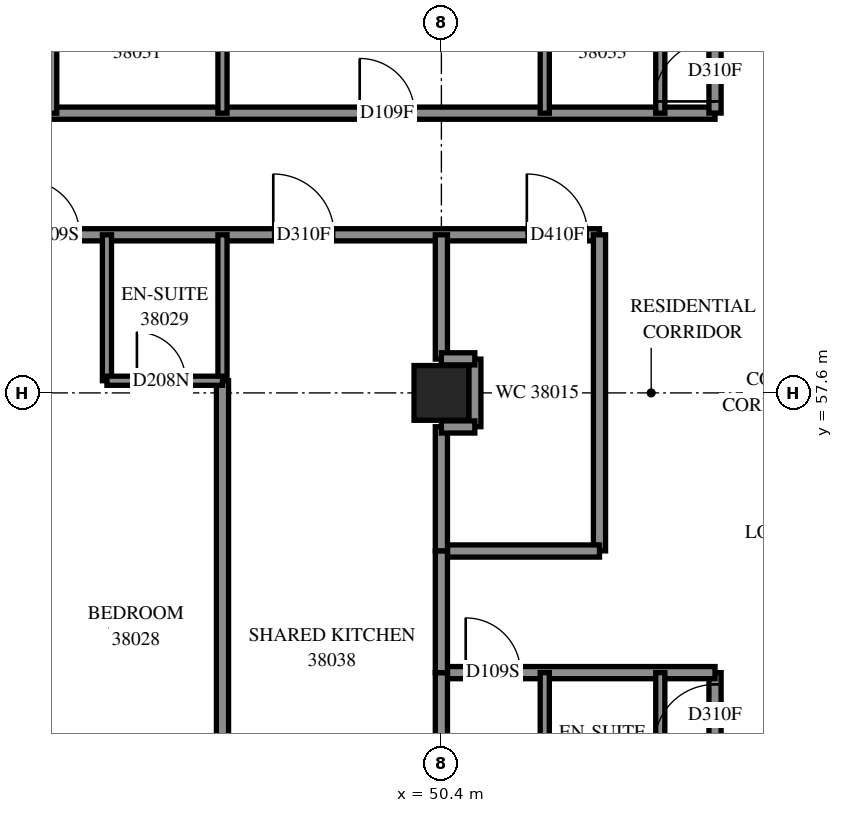
"""IFC4 building model, lengths in metres.
Left out: names, types, materials, properties, quantities, classifications, styles, units other than length and angle.
Written with IfcOpenShell. Run it as: python <this file> out.ifc"""

import sys

from ifc_helpers import new_model, si_unit, direction, frame, frame_2d, origin, origin_2d, place, context, subcontext, project, spatial, rectangle, extrude, element, fill, save


model = new_model("IFC4")
c1 = context("Model", 3, precision=1e-05, world=origin(), true_north=direction((0.0, 1.0)))
c2 = subcontext(c1, "Body", "Model", "MODEL_VIEW")
j1 = project(units=[si_unit("LENGTHUNIT", "METRE"), si_unit("PLANEANGLEUNIT", "RADIAN")], contexts=[c1])
p1 = place(None, origin())
s1 = spatial("IfcSite", under=j1, at=p1, CompositionType="ELEMENT")
p2 = place(p1, origin())
s2 = spatial("IfcBuilding", under=s1, at=p2, CompositionType="ELEMENT")
p3 = place(p2, frame((0.0, 0.0, 142.2)))
s3 = spatial("IfcBuildingStorey", under=s2, at=p3, CompositionType="ELEMENT", Elevation=142.2)
p4 = place(p3, frame((50.4, 57.6, 0.0), z_axis=(0.0, 0.0, 1.0), x_axis=(1.0, 0.0, 0.0)))
e1 = element("IfcColumn", 1, at=p4, inside=s3, PredefinedType="COLUMN", context=c2, shape_type="SweptSolid", body=[
    extrude(rectangle(XDim=0.9, YDim=0.9, at=origin_2d()), origin(), (0.0, 0.0, 1.0), 3.1),
])
p5 = place(p3, frame((36.0, 60.2, 0.0), z_axis=(0.0, 0.0, 1.0), x_axis=(1.0, 0.0, 0.0)))
e2 = element("IfcWall", 2, at=p5, inside=s3, PredefinedType="PARTITIONING", context=c2, shape_type="SweptSolid", body=[
    extrude(rectangle(XDim=17.0, YDim=0.2, at=frame_2d((8.5, 0.0))), origin(), (0.0, 0.0, 1.0), 3.1),
])
p6 = place(p5, frame((15.805, 0.0, 0.0)))
e3 = element("IfcOpeningElement", 3, at=p6, cuts=e2, PredefinedType="OPENING", context=c2, shape_type="SweptSolid", body=[
    extrude(rectangle(XDim=1.0, YDim=2.1, at=frame_2d((0.5, 1.05))), frame((0.0, 0.11, 0.0), z_axis=(0.0, -1.0, 0.0), x_axis=(1.0, 0.0, 0.0)), (0.0, 0.0, 1.0), 0.22),
])
p7 = place(p5, frame((4.125, 0.0, 0.0)))
e4 = element("IfcOpeningElement", 4, at=p7, cuts=e2, PredefinedType="OPENING", context=c2, shape_type="SweptSolid", body=[
    extrude(rectangle(XDim=1.0, YDim=2.1, at=frame_2d((0.5, 1.05))), frame((0.0, 0.11, 0.0), z_axis=(0.0, -1.0, 0.0), x_axis=(1.0, 0.0, 0.0)), (0.0, 0.0, 1.0), 0.22),
])
p8 = place(p5, frame((7.55, 0.0, 0.0)))
e5 = element("IfcOpeningElement", 5, at=p8, cuts=e2, PredefinedType="OPENING", context=c2, shape_type="SweptSolid", body=[
    extrude(rectangle(XDim=0.9, YDim=2.1, at=frame_2d((0.45, 1.05))), frame((0.0, 0.11, 0.0), z_axis=(0.0, -1.0, 0.0), x_axis=(1.0, 0.0, 0.0)), (0.0, 0.0, 1.0), 0.22),
])
p9 = place(p5, frame((11.635, 0.0, 0.0)))
e6 = element("IfcOpeningElement", 6, at=p9, cuts=e2, PredefinedType="OPENING", context=c2, shape_type="SweptSolid", body=[
    extrude(rectangle(XDim=1.0, YDim=2.1, at=frame_2d((0.5, 1.05))), frame((0.0, 0.11, 0.0), z_axis=(0.0, -1.0, 0.0), x_axis=(1.0, 0.0, 0.0)), (0.0, 0.0, 1.0), 0.22),
])
p10 = place(p3, frame((40.602, 62.2, 0.0), z_axis=(0.0, 0.0, 1.0), x_axis=(1.0, 0.0, 0.0)))
e7 = element("IfcWall", 7, at=p10, inside=s3, PredefinedType="PARTITIONING", context=c2, shape_type="SweptSolid", body=[
    extrude(rectangle(XDim=14.298, YDim=0.2, at=frame_2d((7.149, 0.0))), origin(), (0.0, 0.0, 1.0), 3.1),
])
p11 = place(p10, frame((1.306, 0.0, 0.0)))
e8 = element("IfcOpeningElement", 8, at=p11, cuts=e7, PredefinedType="OPENING", context=c2, shape_type="SweptSolid", body=[
    extrude(rectangle(XDim=0.9, YDim=2.1, at=frame_2d((0.45, 1.05))), frame((0.0, 0.11, 0.0), z_axis=(0.0, -1.0, 0.0), x_axis=(1.0, 0.0, 0.0)), (0.0, 0.0, 1.0), 0.22),
])
p12 = place(p10, frame((8.455, 0.0, 0.0)))
e9 = element("IfcOpeningElement", 9, at=p12, cuts=e7, PredefinedType="OPENING", context=c2, shape_type="SweptSolid", body=[
    extrude(rectangle(XDim=0.9, YDim=2.1, at=frame_2d((0.45, 1.05))), frame((0.0, 0.11, 0.0), z_axis=(0.0, -1.0, 0.0), x_axis=(1.0, 0.0, 0.0)), (0.0, 0.0, 1.0), 0.22),
])
p13 = place(p3, frame((46.8, 49.7, 0.0), z_axis=(0.0, 0.0, 1.0), x_axis=(0.0, 1.0, 0.0)))
e10 = element("IfcWall", 10, at=p13, inside=s3, PredefinedType="PARTITIONING", context=c2, shape_type="SweptSolid", body=[
    extrude(rectangle(XDim=8.1, YDim=0.2, at=frame_2d((4.05, 0.0))), origin(), (0.0, 0.0, 1.0), 3.1),
])
p14 = place(p3, frame((54.9, 47.7, 0.0), z_axis=(0.0, 0.0, 1.0), x_axis=(0.0, 1.0, 0.0)))
e11 = element("IfcWall", 11, at=p14, inside=s3, PredefinedType="PARTITIONING", context=c2, shape_type="SweptSolid", body=[
    extrude(rectangle(XDim=5.3, YDim=0.2, at=frame_2d((2.65, 0.0))), origin(), (0.0, 0.0, 1.0), 3.1),
])
p15 = place(p14, frame((4.106, 0.0, 0.0)))
e12 = element("IfcOpeningElement", 12, at=p15, cuts=e11, PredefinedType="OPENING", context=c2, shape_type="SweptSolid", body=[
    extrude(rectangle(XDim=1.0, YDim=2.1, at=frame_2d((0.5, 1.05))), frame((0.0, 0.11, 0.0), z_axis=(0.0, -1.0, 0.0), x_axis=(1.0, 0.0, 0.0)), (0.0, 0.0, 1.0), 0.22),
])
p16 = place(p3, frame((54.9, 62.202, 0.0), z_axis=(0.0, 0.0, 1.0), x_axis=(0.0, 1.0, 0.0)))
e13 = element("IfcWall", 13, at=p16, inside=s3, PredefinedType="PARTITIONING", context=c2, shape_type="SweptSolid", body=[
    extrude(rectangle(XDim=5.298, YDim=0.2, at=frame_2d((2.649, 0.0))), origin(), (0.0, 0.0, 1.0), 3.1),
])
p17 = place(p16, frame((0.192, 0.0, 0.0)))
e14 = element("IfcOpeningElement", 14, at=p17, cuts=e13, PredefinedType="OPENING", context=c2, shape_type="SweptSolid", body=[
    extrude(rectangle(XDim=1.0, YDim=2.1, at=frame_2d((0.5, 1.05))), frame((0.0, 0.11, 0.0), z_axis=(0.0, -1.0, 0.0), x_axis=(1.0, 0.0, 0.0)), (0.0, 0.0, 1.0), 0.22),
])
p18 = place(p3, frame((53.0, 55.002, 0.0), z_axis=(0.0, 0.0, 1.0), x_axis=(0.0, 1.0, 0.0)))
e15 = element("IfcWall", 15, at=p18, inside=s3, PredefinedType="PARTITIONING", context=c2, shape_type="SweptSolid", body=[
    extrude(rectangle(XDim=5.198, YDim=0.2, at=frame_2d((2.599, 0.0))), origin(), (0.0, 0.0, 1.0), 3.1),
])
p19 = place(p3, frame((50.4, 53.0, 0.0), z_axis=(0.0, 0.0, 1.0), x_axis=(1.0, 0.0, 0.0)))
e16 = element("IfcWall", 16, at=p19, inside=s3, PredefinedType="PARTITIONING", context=c2, shape_type="SweptSolid", body=[
    extrude(rectangle(XDim=4.5, YDim=0.2, at=frame_2d((2.25, 0.0))), origin(), (0.0, 0.0, 1.0), 3.1),
])
p20 = place(p19, frame((0.4, 0.0, 0.0)))
e17 = element("IfcOpeningElement", 17, at=p20, cuts=e16, PredefinedType="OPENING", context=c2, shape_type="SweptSolid", body=[
    extrude(rectangle(XDim=0.9, YDim=2.1, at=frame_2d((0.45, 1.05))), frame((0.0, 0.11, 0.0), z_axis=(0.0, -1.0, 0.0), x_axis=(1.0, 0.0, 0.0)), (0.0, 0.0, 1.0), 0.22),
])
p21 = place(p3, frame((50.4, 55.0, 0.0), z_axis=(0.0, 0.0, 1.0), x_axis=(1.0, 0.0, 0.0)))
e18 = element("IfcWall", 18, at=p21, inside=s3, PredefinedType="PARTITIONING", context=c2, shape_type="SweptSolid", body=[
    extrude(rectangle(XDim=2.6, YDim=0.2, at=frame_2d((1.3, 0.0))), origin(), (0.0, 0.0, 1.0), 3.1),
])
for number, where, z_axis, x_axis in (
    (19, (44.9, 57.8, 0.0), (0.0, 0.0, 1.0), (0.0, 1.0, 0.0)),
    (20, (46.8, 57.8, 0.0), (0.0, 0.0, 1.0), (0.0, 1.0, 0.0)),
    (21, (52.1, 50.6, 0.0), (0.0, 0.0, 1.0), (0.0, 1.0, 0.0)),
    (22, (54.0, 50.6, 0.0), (0.0, 0.0, 1.0), (0.0, 1.0, 0.0)),
    (23, (44.0, 62.2, 0.0), (0.0, 0.0, 1.0), (0.0, 1.0, 0.0)),
    (24, (46.8, 62.2, 0.0), (0.0, 0.0, 1.0), (0.0, 1.0, 0.0)),
    (25, (52.1, 62.2, 0.0), (0.0, 0.0, 1.0), (0.0, 1.0, 0.0)),
    (26, (54.0, 62.2, 0.0), (0.0, 0.0, 1.0), (0.0, 1.0, 0.0)),
):
    element("IfcWall", number, at=place(p3, frame(where, z_axis=z_axis, x_axis=x_axis)), inside=s3, PredefinedType="PARTITIONING", context=c2, shape_type="SweptSolid", body=[
        extrude(rectangle(XDim=2.4, YDim=0.15, at=frame_2d((1.2, 0.0))), origin(), (0.0, 0.0, 1.0), 3.1),
    ])
p22 = place(p3, frame((50.4, 50.85, 0.0), z_axis=(0.0, 0.0, 1.0), x_axis=(0.0, 1.0, 0.0)))
e27 = element("IfcWall", 27, at=p22, inside=s3, PredefinedType="PARTITIONING", context=c2, shape_type="SweptSolid", body=[
    extrude(rectangle(XDim=2.15, YDim=0.2, at=frame_2d((1.075, 0.0))), origin(), (0.0, 0.0, 1.0), 3.1),
])
for number, where, z_axis, x_axis in (
    (28, (50.4, 58.156, 0.0), (0.0, 0.0, 1.0), (0.0, 1.0, 0.0)),
    (29, (50.4, 55.0, 0.0), (0.0, 0.0, 1.0), (0.0, 1.0, 0.0)),
):
    element("IfcWall", number, at=place(p3, frame(where, z_axis=z_axis, x_axis=x_axis)), inside=s3, PredefinedType="PARTITIONING", context=c2, shape_type="SweptSolid", body=[
        extrude(rectangle(XDim=2.044, YDim=0.2, at=frame_2d((1.022, 0.0))), origin(), (0.0, 0.0, 1.0), 3.1),
    ])
p23 = place(p3, frame((50.4, 53.0, 0.0), z_axis=(0.0, 0.0, 1.0), x_axis=(0.0, 1.0, 0.0)))
e30 = element("IfcWall", 30, at=p23, inside=s3, PredefinedType="PARTITIONING", context=c2, shape_type="SweptSolid", body=[
    extrude(rectangle(XDim=2.0, YDim=0.2, at=frame_2d((1.0, 0.0))), origin(), (0.0, 0.0, 1.0), 3.1),
])
p24 = place(p3, frame((44.9, 57.8, 0.0), z_axis=(0.0, 0.0, 1.0), x_axis=(1.0, 0.0, 0.0)))
e31 = element("IfcWall", 31, at=p24, inside=s3, PredefinedType="PARTITIONING", context=c2, shape_type="SweptSolid", body=[
    extrude(rectangle(XDim=1.9, YDim=0.15, at=frame_2d((0.95, 0.0))), origin(), (0.0, 0.0, 1.0), 3.1),
])
p25 = place(p24, frame((0.493, 0.0, 0.0)))
e32 = element("IfcOpeningElement", 32, at=p25, cuts=e31, PredefinedType="OPENING", context=c2, shape_type="SweptSolid", body=[
    extrude(rectangle(XDim=0.8, YDim=2.1, at=frame_2d((0.4, 1.05))), frame((0.0, 0.085, 0.0), z_axis=(0.0, -1.0, 0.0), x_axis=(1.0, 0.0, 0.0)), (0.0, 0.0, 1.0), 0.17),
])
p26 = place(p3, frame((50.95, 57.044, 0.0), z_axis=(0.0, 0.0, 1.0), x_axis=(0.0, 1.0, 0.0)))
e33 = element("IfcWall", 33, at=p26, inside=s3, PredefinedType="PARTITIONING", context=c2, shape_type="SweptSolid", body=[
    extrude(rectangle(XDim=1.112, YDim=0.2, at=frame_2d((0.556, 0.0))), origin(), (0.0, 0.0, 1.0), 3.1),
])
for number, where, z_axis, x_axis in (
    (34, (50.4, 57.04, 0.0), (0.0, 0.0, 1.0), (1.0, 0.0, 0.0)),
    (35, (50.4, 58.16, 0.0), (0.0, 0.0, 1.0), (1.0, 0.0, 0.0)),
):
    element("IfcWall", number, at=place(p3, frame(where, z_axis=z_axis, x_axis=x_axis)), inside=s3, PredefinedType="PARTITIONING", context=c2, shape_type="SweptSolid", body=[
        extrude(rectangle(XDim=0.55, YDim=0.2, at=frame_2d((0.275, 0.0))), origin(), (0.0, 0.0, 1.0), 3.1),
    ])
p27 = place(p6, origin())
e36 = element("IfcDoor", 36, at=p27, inside=s3, OperationType="SINGLE_SWING_LEFT", PredefinedType="DOOR", context=c2, shape_type="SweptSolid", body=[
    extrude(rectangle(XDim=1.0, YDim=2.1, at=frame_2d((0.5, 1.05))), frame((0.0, 0.025, 0.0), z_axis=(0.0, -1.0, 0.0), x_axis=(1.0, 0.0, 0.0)), (0.0, 0.0, 1.0), 0.05),
])
fill(e3, e36)
p28 = place(p8, origin())
e37 = element("IfcDoor", 37, at=p28, inside=s3, OperationType="SINGLE_SWING_LEFT", PredefinedType="DOOR", context=c2, shape_type="SweptSolid", body=[
    extrude(rectangle(XDim=0.9, YDim=2.1, at=frame_2d((0.45, 1.05))), frame((0.0, 0.025, 0.0), z_axis=(0.0, -1.0, 0.0), x_axis=(1.0, 0.0, 0.0)), (0.0, 0.0, 1.0), 0.05),
])
fill(e5, e37)
p29 = place(p25, origin())
e38 = element("IfcDoor", 38, at=p29, inside=s3, OperationType="SINGLE_SWING_RIGHT", PredefinedType="DOOR", context=c2, shape_type="SweptSolid", body=[
    extrude(rectangle(XDim=0.8, YDim=2.1, at=frame_2d((0.4, 1.05))), frame((0.0, 0.025, 0.0), z_axis=(0.0, -1.0, 0.0), x_axis=(1.0, 0.0, 0.0)), (0.0, 0.0, 1.0), 0.05),
])
fill(e32, e38)
p30 = place(p12, origin())
e39 = element("IfcDoor", 39, at=p30, inside=s3, OperationType="SINGLE_SWING_LEFT", PredefinedType="DOOR", context=c2, shape_type="SweptSolid", body=[
    extrude(rectangle(XDim=0.9, YDim=2.1, at=frame_2d((0.45, 1.05))), frame((0.0, 0.025, 0.0), z_axis=(0.0, -1.0, 0.0), x_axis=(1.0, 0.0, 0.0)), (0.0, 0.0, 1.0), 0.05),
])
fill(e9, e39)
p31 = place(p17, origin())
e40 = element("IfcDoor", 40, at=p31, inside=s3, OperationType="SINGLE_SWING_LEFT", PredefinedType="DOOR", context=c2, shape_type="SweptSolid", body=[
    extrude(rectangle(XDim=1.0, YDim=2.1, at=frame_2d((0.5, 1.05))), frame((0.0, 0.025, 0.0), z_axis=(0.0, -1.0, 0.0), x_axis=(1.0, 0.0, 0.0)), (0.0, 0.0, 1.0), 0.05),
])
fill(e14, e40)
p32 = place(p9, origin())
e41 = element("IfcDoor", 41, at=p32, inside=s3, OperationType="SINGLE_SWING_RIGHT", PredefinedType="DOOR", context=c2, shape_type="SweptSolid", body=[
    extrude(rectangle(XDim=1.0, YDim=2.1, at=frame_2d((0.5, 1.05))), frame((0.0, 0.025, 0.0), z_axis=(0.0, -1.0, 0.0), x_axis=(1.0, 0.0, 0.0)), (0.0, 0.0, 1.0), 0.05),
])
fill(e6, e41)
p33 = place(p20, origin())
e42 = element("IfcDoor", 42, at=p33, inside=s3, OperationType="SINGLE_SWING_LEFT", PredefinedType="DOOR", context=c2, shape_type="SweptSolid", body=[
    extrude(rectangle(XDim=0.9, YDim=2.1, at=frame_2d((0.45, 1.05))), frame((0.0, 0.025, 0.0), z_axis=(0.0, -1.0, 0.0), x_axis=(1.0, 0.0, 0.0)), (0.0, 0.0, 1.0), 0.05),
])
fill(e17, e42)
p34 = place(p15, origin())
e43 = element("IfcDoor", 43, at=p34, inside=s3, OperationType="SINGLE_SWING_RIGHT", PredefinedType="DOOR", context=c2, shape_type="SweptSolid", body=[
    extrude(rectangle(XDim=1.0, YDim=2.1, at=frame_2d((0.5, 1.05))), frame((0.0, 0.025, 0.0), z_axis=(0.0, -1.0, 0.0), x_axis=(1.0, 0.0, 0.0)), (0.0, 0.0, 1.0), 0.05),
])
fill(e12, e43)
save(model, sys.argv[1])
